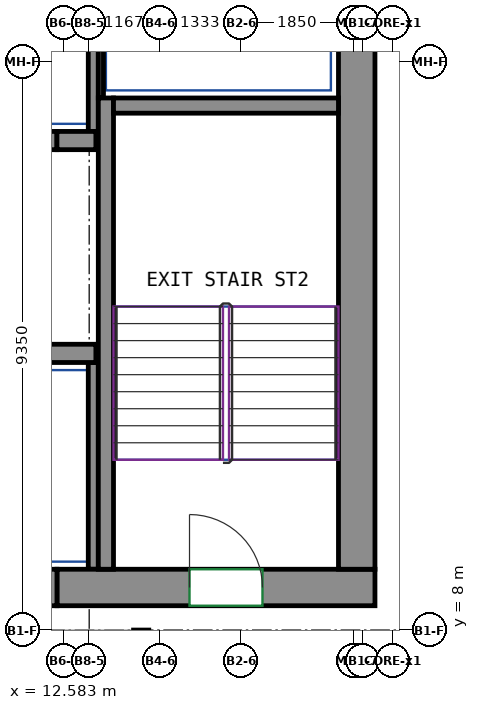
"""IFC4 building model, lengths in metres.
Left out: names, types, materials, properties, quantities, classifications, styles, units other than length and angle.
Written with IfcOpenShell. Run it as: python <this file> out.ifc"""

import sys

from ifc_helpers import new_model, si_unit, direction, frame, frame_2d, origin, place, context, subcontext, project, spatial, rectangle, extrude, source, transform, mapped, element, fill, save


model = new_model("IFC4")
c1 = context("Model", 3, precision=1e-05, world=origin(), true_north=direction((0.0, 1.0)))
c2 = subcontext(c1, "Body", "Model", "MODEL_VIEW")
j1 = project(units=[si_unit("LENGTHUNIT", "METRE"), si_unit("PLANEANGLEUNIT", "RADIAN")], contexts=[c1])
p1 = place(None, origin())
s1 = spatial("IfcSite", under=j1, at=p1, CompositionType="ELEMENT")
p2 = place(p1, origin())
s2 = spatial("IfcBuilding", under=s1, at=p2, CompositionType="ELEMENT")
p3 = place(p2, frame((0.0, 0.0, 277.2)))
s3 = spatial("IfcBuildingStorey", under=s2, at=p3, CompositionType="ELEMENT", Elevation=277.2)
m1 = source(origin(), c2, "Body", "SweptSolid", [
    extrude(rectangle(XDim=5.23, YDim=0.6, at=frame_2d((2.615, 0.0))), origin(), (0.0, 0.0, 1.0), 3.12),
])
p4 = place(p3, frame((12.47, 8.7, 0.0), z_axis=(0.0, 0.0, 1.0), x_axis=(1.0, 0.0, 0.0)))
e1 = element("IfcWall", 1, at=p4, inside=s3, PredefinedType="SHEAR", context=c2, shape_type="MappedRepresentation", body=[
    mapped(m1, transform((0.0, 0.0, 0.0))),
])
p5 = place(p4, frame((2.18, 0.0, 0.0)))
e2 = element("IfcOpeningElement", 2, at=p5, cuts=e1, PredefinedType="OPENING", context=c2, shape_type="SweptSolid", body=[
    extrude(rectangle(XDim=1.2, YDim=2.1, at=frame_2d((0.6, 1.05))), frame((0.0, 0.31, 0.0), z_axis=(0.0, -1.0, 0.0), x_axis=(1.0, 0.0, 0.0)), (0.0, 0.0, 1.0), 0.62),
])
m2 = source(origin(), c2, "Body", "SweptSolid", [
    extrude(rectangle(XDim=12.0, YDim=0.6, at=frame_2d((6.0, 0.0))), origin(), (0.0, 0.0, 1.0), 3.12),
])
p6 = place(p3, frame((17.4, 9.0, 0.0), z_axis=(0.0, 0.0, 1.0), x_axis=(0.0, 1.0, 0.0)))
e3 = element("IfcWall", 3, at=p6, inside=s3, PredefinedType="SHEAR", context=c2, shape_type="MappedRepresentation", body=[
    mapped(m2, transform((0.0, 0.0, 0.0))),
])
m3 = source(origin(), c2, "Body", "SweptSolid", [
    extrude(rectangle(XDim=7.75, YDim=0.25, at=frame_2d((3.875, 0.0))), origin(), (0.0, 0.0, 1.0), 3.12),
])
p7 = place(p3, frame((13.275, 9.0, 0.0), z_axis=(0.0, 0.0, 1.0), x_axis=(0.0, 1.0, 0.0)))
e4 = element("IfcWall", 4, at=p7, inside=s3, PredefinedType="SHEAR", context=c2, shape_type="MappedRepresentation", body=[
    mapped(m3, transform((0.0, 0.0, 0.0))),
])
m4 = source(origin(), c2, "Body", "SweptSolid", [
    extrude(rectangle(XDim=3.7, YDim=0.25, at=frame_2d((1.85, 0.0))), origin(), (0.0, 0.0, 1.0), 3.12),
])
p8 = place(p3, frame((13.4, 16.625, 0.0), z_axis=(0.0, 0.0, 1.0), x_axis=(1.0, 0.0, 0.0)))
e5 = element("IfcWall", 5, at=p8, inside=s3, PredefinedType="SHEAR", context=c2, shape_type="MappedRepresentation", body=[
    mapped(m4, transform((0.0, 0.0, 0.0))),
])
m5 = source(origin(), c2, "Body", "SweptSolid", [
    extrude(rectangle(XDim=2.82, YDim=0.3, at=frame_2d((1.41, 0.0))), origin(), (0.0, 0.0, 1.0), 3.12),
])
p9 = place(p3, frame((10.29, 12.55, 0.0), z_axis=(0.0, 0.0, 1.0), x_axis=(1.0, 0.0, 0.0)))
e6 = element("IfcWall", 6, at=p9, inside=s3, PredefinedType="SHEAR", context=c2, shape_type="MappedRepresentation", body=[
    mapped(m5, transform((0.0, 0.0, 0.0))),
])
m6 = source(origin(), c2, "Body", "SweptSolid", [
    extrude(rectangle(XDim=0.64, YDim=0.3, at=frame_2d((0.32, 0.0))), origin(), (0.0, 0.0, 1.0), 3.12),
])
p10 = place(p3, frame((12.47, 16.05, 0.0), z_axis=(0.0, 0.0, 1.0), x_axis=(1.0, 0.0, 0.0)))
e7 = element("IfcWall", 7, at=p10, inside=s3, PredefinedType="SHEAR", context=c2, shape_type="MappedRepresentation", body=[
    mapped(m6, transform((0.0, 0.0, 0.0))),
])
m7 = source(origin(), c2, "Body", "SweptSolid", [
    extrude(rectangle(XDim=1.4, YDim=0.3, at=frame_2d((0.7, 0.0))), origin(), (0.0, 0.0, 1.0), 3.12),
])
p11 = place(p3, frame((11.07, 16.05, 0.0), z_axis=(0.0, 0.0, 1.0), x_axis=(1.0, 0.0, 0.0)))
e8 = element("IfcWall", 8, at=p11, inside=s3, PredefinedType="PARTITIONING", context=c2, shape_type="MappedRepresentation", body=[
    mapped(m7, transform((0.0, 0.0, 0.0))),
])
p12 = place(p11, frame((0.15, 0.0, 0.0)))
e9 = element("IfcOpeningElement", 9, at=p12, cuts=e8, PredefinedType="OPENING", context=c2, shape_type="SweptSolid", body=[
    extrude(rectangle(XDim=1.1, YDim=2.1, at=frame_2d((0.55, 1.05))), frame((0.0, 0.16, 0.0), z_axis=(0.0, -1.0, 0.0), x_axis=(1.0, 0.0, 0.0)), (0.0, 0.0, 1.0), 0.32),
])
m8 = source(origin(), c2, "Body", "SweptSolid", [
    extrude(rectangle(XDim=3.275, YDim=0.165, at=frame_2d((1.638, 0.0))), origin(), (0.0, 0.0, 1.0), 3.12),
])
p13 = place(p3, frame((13.067, 16.2, 0.0), z_axis=(0.0, 0.0, 1.0), x_axis=(0.0, 1.0, 0.0)))
e10 = element("IfcWall", 10, at=p13, inside=s3, PredefinedType="PARTITIONING", context=c2, shape_type="MappedRepresentation", body=[
    mapped(m8, transform((0.0, 0.0, 0.0))),
])
m9 = source(origin(), c2, "Body", "SweptSolid", [
    extrude(rectangle(XDim=2.725, YDim=0.085, at=frame_2d((1.363, 0.0))), origin(), (0.0, 0.0, 1.0), 3.12),
])
p14 = place(p3, frame((13.192, 16.75, 0.0), z_axis=(0.0, 0.0, 1.0), x_axis=(0.0, 1.0, 0.0)))
e11 = element("IfcWall", 11, at=p14, inside=s3, PredefinedType="PARTITIONING", context=c2, shape_type="MappedRepresentation", body=[
    mapped(m9, transform((0.0, 0.0, 0.0))),
])
m10 = source(origin(), c2, "Body", "SweptSolid", [
    extrude(rectangle(XDim=3.4, YDim=0.165, at=frame_2d((1.7, 0.0))), origin(), (0.0, 0.0, 1.0), 3.12),
])
p15 = place(p3, frame((13.067, 9.0, 0.0), z_axis=(0.0, 0.0, 1.0), x_axis=(0.0, 1.0, 0.0)))
e12 = element("IfcWall", 12, at=p15, inside=s3, PredefinedType="PARTITIONING", context=c2, shape_type="MappedRepresentation", body=[
    mapped(m10, transform((0.0, 0.0, 0.0))),
])
m11 = source(origin(), c2, "Body", "SweptSolid", [
    extrude(rectangle(XDim=1.4, YDim=0.6, at=frame_2d((0.7, 0.0))), origin(), (0.0, 0.0, 1.0), 2.7),
])
p16 = place(p3, frame((11.07, 8.7, 0.0), z_axis=(0.0, 0.0, 1.0), x_axis=(1.0, 0.0, 0.0)))
e13 = element("IfcWall", 13, at=p16, inside=s3, PredefinedType="PARTITIONING", context=c2, shape_type="MappedRepresentation", body=[
    mapped(m11, transform((0.0, 0.0, 0.0))),
])
p17 = place(p16, frame((0.25, 0.0, 0.0)))
e14 = element("IfcOpeningElement", 14, at=p17, cuts=e13, PredefinedType="OPENING", context=c2, shape_type="SweptSolid", body=[
    extrude(rectangle(XDim=0.9, YDim=2.1, at=frame_2d((0.45, 1.05))), frame((0.0, 0.31, 0.0), z_axis=(0.0, -1.0, 0.0), x_axis=(1.0, 0.0, 0.0)), (0.0, 0.0, 1.0), 0.62),
])
p18 = place(p5, origin())
e15 = element("IfcDoor", 15, at=p18, inside=s3, OperationType="DOUBLE_DOOR_SINGLE_SWING", PredefinedType="DOOR", context=c2, shape_type="SweptSolid", body=[
    extrude(rectangle(XDim=1.2, YDim=2.1, at=frame_2d((0.6, 1.05))), frame((0.0, 0.205, 0.0), z_axis=(0.0, -1.0, 0.0), x_axis=(1.0, 0.0, 0.0)), (0.0, 0.0, 1.0), 0.05),
])
fill(e2, e15)
save(model, sys.argv[1])
